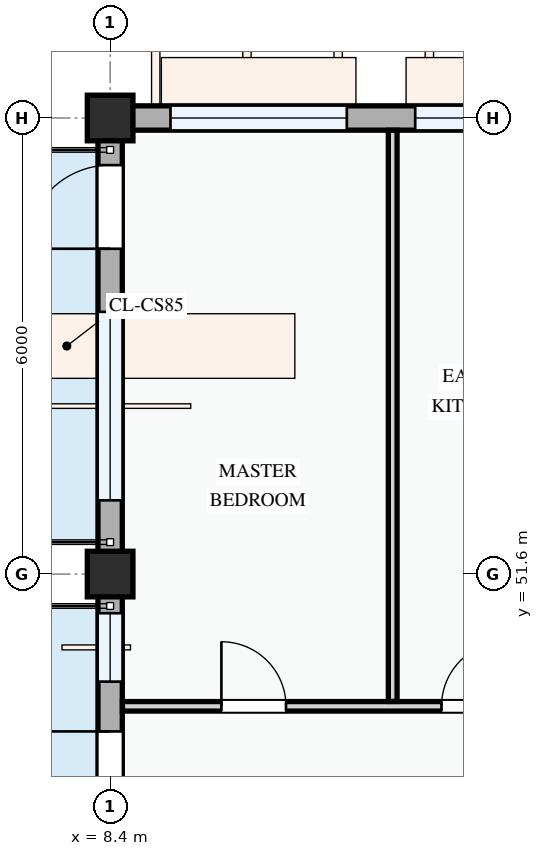
"""IFC4 building model, lengths in metres.
Left out: names, types, materials, properties, quantities, classifications, styles, units other than length and angle.
Written with IfcOpenShell. Run it as: python <this file> out.ifc"""

import sys

from ifc_helpers import new_model, si_unit, direction, frame, frame_2d, origin, origin_2d, place, context, subcontext, project, spatial, rectangle, extrude, element, fill, save


model = new_model("IFC4")
c1 = context("Model", 3, precision=1e-05, world=origin(), true_north=direction((0.0, 1.0)))
c2 = subcontext(c1, "Body", "Model", "MODEL_VIEW")
j1 = project(units=[si_unit("LENGTHUNIT", "METRE"), si_unit("PLANEANGLEUNIT", "RADIAN")], contexts=[c1])
p1 = place(None, origin())
s1 = spatial("IfcSite", under=j1, at=p1, CompositionType="ELEMENT")
p2 = place(p1, origin())
s2 = spatial("IfcBuilding", under=s1, at=p2, CompositionType="ELEMENT")
p3 = place(p2, frame((0.0, 0.0, 14.7)))
s3 = spatial("IfcBuildingStorey", under=s2, at=p3, CompositionType="ELEMENT", Elevation=14.7)
for number, where, z_axis, x_axis in (
    (1, (8.4, 51.6, 0.0), (0.0, 0.0, 1.0), (1.0, 0.0, 0.0)),
    (2, (8.4, 57.6, 0.0), (0.0, 0.0, 1.0), (1.0, 0.0, 0.0)),
):
    element("IfcColumn", number, at=place(p3, frame(where, z_axis=z_axis, x_axis=x_axis)), inside=s3, PredefinedType="COLUMN", context=c2, shape_type="SweptSolid", body=[
        extrude(rectangle(XDim=0.6, YDim=0.6, at=origin_2d()), origin(), (0.0, 0.0, 1.0), 3.3),
    ])
p4 = place(p3, frame((14.4, 57.6, 0.0), z_axis=(0.0, 0.0, 1.0), x_axis=(-1.0, 0.0, 0.0)))
e3 = element("IfcWall", 3, at=p4, inside=s3, PredefinedType="STANDARD", context=c2, shape_type="SweptSolid", body=[
    extrude(rectangle(XDim=6.0, YDim=0.32, at=frame_2d((3.0, 0.0))), origin(), (0.0, 0.0, 1.0), 2.475),
])
p5 = place(p4, frame((0.486, 0.0, 0.78)))
e4 = element("IfcOpeningElement", 4, at=p5, cuts=e3, PredefinedType="OPENING", context=c2, shape_type="SweptSolid", body=[
    extrude(rectangle(XDim=1.5, YDim=1.5, at=frame_2d((0.75, 0.75))), frame((0.0, 0.17, 0.0), z_axis=(0.0, -1.0, 0.0), x_axis=(1.0, 0.0, 0.0)), (0.0, 0.0, 1.0), 0.34),
])
p6 = place(p4, frame((2.886, 0.0, 0.78)))
e5 = element("IfcOpeningElement", 5, at=p6, cuts=e3, PredefinedType="OPENING", context=c2, shape_type="SweptSolid", body=[
    extrude(rectangle(XDim=2.32, YDim=1.5, at=frame_2d((1.16, 0.75))), frame((0.0, 0.17, 0.0), z_axis=(0.0, -1.0, 0.0), x_axis=(1.0, 0.0, 0.0)), (0.0, 0.0, 1.0), 0.34),
])
p7 = place(p3, frame((8.4, 57.6, 0.0), z_axis=(0.0, 0.0, 1.0), x_axis=(0.0, -1.0, 0.0)))
e6 = element("IfcWall", 6, at=p7, inside=s3, PredefinedType="STANDARD", context=c2, shape_type="SweptSolid", body=[
    extrude(rectangle(XDim=6.0, YDim=0.32, at=frame_2d((3.0, 0.0))), origin(), (0.0, 0.0, 1.0), 2.445),
])
p8 = place(p7, frame((0.62, 0.0, 0.0)))
e7 = element("IfcOpeningElement", 7, at=p8, cuts=e6, PredefinedType="OPENING", context=c2, shape_type="SweptSolid", body=[
    extrude(rectangle(XDim=1.1, YDim=2.15, at=frame_2d((0.55, 1.075))), frame((0.0, 0.17, 0.0), z_axis=(0.0, -1.0, 0.0), x_axis=(1.0, 0.0, 0.0)), (0.0, 0.0, 1.0), 0.34),
])
p9 = place(p7, frame((2.55, 0.0, 0.78)))
e8 = element("IfcOpeningElement", 8, at=p9, cuts=e6, PredefinedType="OPENING", context=c2, shape_type="SweptSolid", body=[
    extrude(rectangle(XDim=2.48, YDim=1.46, at=frame_2d((1.24, 0.73))), frame((0.0, 0.17, 0.0), z_axis=(0.0, -1.0, 0.0), x_axis=(1.0, 0.0, 0.0)), (0.0, 0.0, 1.0), 0.34),
])
p10 = place(p3, frame((8.4, 51.6, 0.0), z_axis=(0.0, 0.0, 1.0), x_axis=(0.0, -1.0, 0.0)))
e9 = element("IfcWall", 9, at=p10, inside=s3, PredefinedType="STANDARD", context=c2, shape_type="SweptSolid", body=[
    extrude(rectangle(XDim=8.4, YDim=0.32, at=frame_2d((4.2, 0.0))), origin(), (0.0, 0.0, 1.0), 2.345),
])
p11 = place(p10, frame((2.07, 0.0, 0.0)))
e10 = element("IfcOpeningElement", 10, at=p11, cuts=e9, PredefinedType="OPENING", context=c2, shape_type="SweptSolid", body=[
    extrude(rectangle(XDim=1.2, YDim=2.15, at=frame_2d((0.6, 1.075))), frame((0.0, 0.17, 0.0), z_axis=(0.0, -1.0, 0.0), x_axis=(1.0, 0.0, 0.0)), (0.0, 0.0, 1.0), 0.34),
])
p12 = place(p10, frame((0.515, 0.0, 0.78)))
e11 = element("IfcOpeningElement", 11, at=p12, cuts=e9, PredefinedType="OPENING", context=c2, shape_type="SweptSolid", body=[
    extrude(rectangle(XDim=0.9, YDim=1.2, at=frame_2d((0.45, 0.6))), frame((0.0, 0.17, 0.0), z_axis=(0.0, -1.0, 0.0), x_axis=(1.0, 0.0, 0.0)), (0.0, 0.0, 1.0), 0.34),
])
p13 = place(p10, frame((3.83, 0.0, 0.78)))
e12 = element("IfcOpeningElement", 12, at=p13, cuts=e9, PredefinedType="OPENING", context=c2, shape_type="SweptSolid", body=[
    extrude(rectangle(XDim=2.28, YDim=1.46, at=frame_2d((1.14, 0.73))), frame((0.0, 0.17, 0.0), z_axis=(0.0, -1.0, 0.0), x_axis=(1.0, 0.0, 0.0)), (0.0, 0.0, 1.0), 0.34),
])
p14 = place(p10, frame((6.94, 0.0, 0.78)))
e13 = element("IfcOpeningElement", 13, at=p14, cuts=e9, PredefinedType="OPENING", context=c2, shape_type="SweptSolid", body=[
    extrude(rectangle(XDim=0.95, YDim=1.15, at=frame_2d((0.475, 0.575))), frame((0.0, 0.17, 0.0), z_axis=(0.0, -1.0, 0.0), x_axis=(1.0, 0.0, 0.0)), (0.0, 0.0, 1.0), 0.34),
])
p15 = place(p3, frame((8.562, 49.86, 0.0), z_axis=(0.0, 0.0, 1.0), x_axis=(1.0, 0.0, 0.0)))
e14 = element("IfcWall", 14, at=p15, inside=s3, PredefinedType="PARTITIONING", context=c2, shape_type="SweptSolid", body=[
    extrude(rectangle(XDim=7.441, YDim=0.125, at=frame_2d((3.72, 0.0))), origin(), (0.0, 0.0, 1.0), 3.0),
])
p16 = place(p15, frame((1.302, 0.0, 0.0)))
e15 = element("IfcOpeningElement", 15, at=p16, cuts=e14, PredefinedType="OPENING", context=c2, shape_type="SweptSolid", body=[
    extrude(rectangle(XDim=0.85, YDim=2.1, at=frame_2d((0.425, 1.05))), frame((0.0, 0.073, 0.0), z_axis=(0.0, -1.0, 0.0), x_axis=(1.0, 0.0, 0.0)), (0.0, 0.0, 1.0), 0.145),
])
p17 = place(p15, frame((4.198, 0.0, 0.0)))
e16 = element("IfcOpeningElement", 16, at=p17, cuts=e14, PredefinedType="OPENING", context=c2, shape_type="SweptSolid", body=[
    extrude(rectangle(XDim=0.85, YDim=2.1, at=frame_2d((0.425, 1.05))), frame((0.0, 0.073, 0.0), z_axis=(0.0, -1.0, 0.0), x_axis=(1.0, 0.0, 0.0)), (0.0, 0.0, 1.0), 0.145),
])
p18 = place(p15, frame((6.204, 0.0, 0.0)))
e17 = element("IfcOpeningElement", 17, at=p18, cuts=e14, PredefinedType="OPENING", context=c2, shape_type="SweptSolid", body=[
    extrude(rectangle(XDim=0.8, YDim=2.1, at=frame_2d((0.4, 1.05))), frame((0.0, 0.073, 0.0), z_axis=(0.0, -1.0, 0.0), x_axis=(1.0, 0.0, 0.0)), (0.0, 0.0, 1.0), 0.145),
])
p19 = place(p3, frame((12.118, 49.925, 0.0), z_axis=(0.0, 0.0, 1.0), x_axis=(0.0, 1.0, 0.0)))
e18 = element("IfcWall", 18, at=p19, inside=s3, PredefinedType="PARTITIONING", context=c2, shape_type="SweptSolid", body=[
    extrude(rectangle(XDim=7.513, YDim=0.115, at=frame_2d((3.757, 0.0))), origin(), (0.0, 0.0, 1.0), 3.0),
])
p20 = place(p5, origin())
e19 = element("IfcWindow", 19, at=p20, inside=s3, PartitioningType="SINGLE_PANEL", PredefinedType="WINDOW", context=c2, shape_type="SweptSolid", body=[
    extrude(rectangle(XDim=1.5, YDim=1.5, at=frame_2d((0.75, 0.75))), frame((0.0, 0.03, 0.0), z_axis=(0.0, -1.0, 0.0), x_axis=(1.0, 0.0, 0.0)), (0.0, 0.0, 1.0), 0.06),
])
fill(e4, e19)
p21 = place(p6, origin())
e20 = element("IfcWindow", 20, at=p21, inside=s3, PartitioningType="DOUBLE_PANEL_VERTICAL", PredefinedType="WINDOW", context=c2, shape_type="SweptSolid", body=[
    extrude(rectangle(XDim=2.32, YDim=1.5, at=frame_2d((1.16, 0.75))), frame((0.0, 0.03, 0.0), z_axis=(0.0, -1.0, 0.0), x_axis=(1.0, 0.0, 0.0)), (0.0, 0.0, 1.0), 0.06),
])
fill(e5, e20)
p22 = place(p8, frame((1.1, 0.0, 0.0), z_axis=(0.0, 0.0, 1.0), x_axis=(-1.0, 0.0, 0.0)))
e21 = element("IfcDoor", 21, at=p22, inside=s3, OperationType="SINGLE_SWING_LEFT", PredefinedType="DOOR", context=c2, shape_type="SweptSolid", body=[
    extrude(rectangle(XDim=1.1, YDim=2.15, at=frame_2d((0.55, 1.075))), frame((0.0, 0.025, 0.0), z_axis=(0.0, -1.0, 0.0), x_axis=(1.0, 0.0, 0.0)), (0.0, 0.0, 1.0), 0.05),
])
fill(e7, e21)
p23 = place(p9, origin())
e22 = element("IfcWindow", 22, at=p23, inside=s3, PartitioningType="DOUBLE_PANEL_VERTICAL", PredefinedType="WINDOW", context=c2, shape_type="SweptSolid", body=[
    extrude(rectangle(XDim=2.48, YDim=1.46, at=frame_2d((1.24, 0.73))), frame((0.0, 0.03, 0.0), z_axis=(0.0, -1.0, 0.0), x_axis=(1.0, 0.0, 0.0)), (0.0, 0.0, 1.0), 0.06),
])
fill(e8, e22)
p24 = place(p11, frame((1.2, 0.0, 0.0), z_axis=(0.0, 0.0, 1.0), x_axis=(-1.0, 0.0, 0.0)))
e23 = element("IfcDoor", 23, at=p24, inside=s3, OperationType="SINGLE_SWING_RIGHT", PredefinedType="DOOR", context=c2, shape_type="SweptSolid", body=[
    extrude(rectangle(XDim=1.2, YDim=2.15, at=frame_2d((0.6, 1.075))), frame((0.0, 0.025, 0.0), z_axis=(0.0, -1.0, 0.0), x_axis=(1.0, 0.0, 0.0)), (0.0, 0.0, 1.0), 0.05),
])
fill(e10, e23)
p25 = place(p12, origin())
e24 = element("IfcWindow", 24, at=p25, inside=s3, PartitioningType="SINGLE_PANEL", PredefinedType="WINDOW", context=c2, shape_type="SweptSolid", body=[
    extrude(rectangle(XDim=0.9, YDim=1.2, at=frame_2d((0.45, 0.6))), frame((0.0, 0.03, 0.0), z_axis=(0.0, -1.0, 0.0), x_axis=(1.0, 0.0, 0.0)), (0.0, 0.0, 1.0), 0.06),
])
fill(e11, e24)
p26 = place(p16, origin())
e25 = element("IfcDoor", 25, at=p26, inside=s3, OperationType="SINGLE_SWING_LEFT", PredefinedType="DOOR", context=c2, shape_type="SweptSolid", body=[
    extrude(rectangle(XDim=0.85, YDim=2.1, at=frame_2d((0.425, 1.05))), frame((0.0, 0.025, 0.0), z_axis=(0.0, -1.0, 0.0), x_axis=(1.0, 0.0, 0.0)), (0.0, 0.0, 1.0), 0.05),
])
fill(e15, e25)
p27 = place(p17, origin())
e26 = element("IfcDoor", 26, at=p27, inside=s3, OperationType="SINGLE_SWING_RIGHT", PredefinedType="DOOR", context=c2, shape_type="SweptSolid", body=[
    extrude(rectangle(XDim=0.85, YDim=2.1, at=frame_2d((0.425, 1.05))), frame((0.0, 0.025, 0.0), z_axis=(0.0, -1.0, 0.0), x_axis=(1.0, 0.0, 0.0)), (0.0, 0.0, 1.0), 0.05),
])
fill(e16, e26)
save(model, sys.argv[1])
